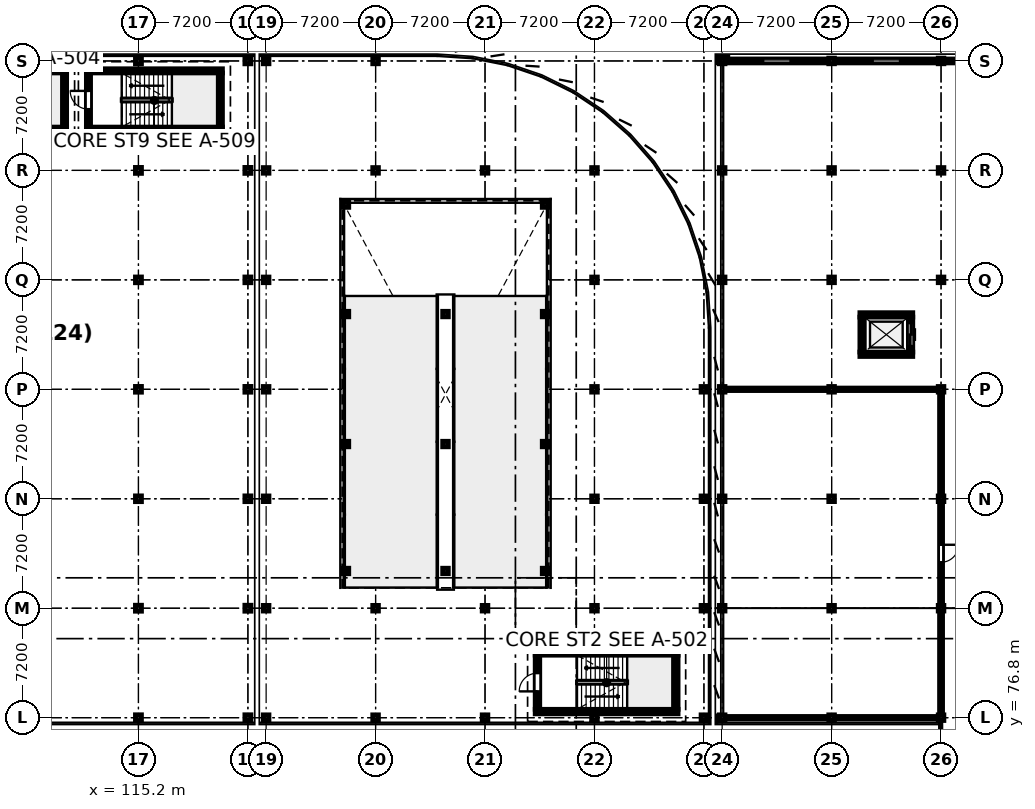
"""IFC4 building model, lengths in metres.
Left out: names, types, materials, properties, quantities, classifications, styles, units other than length and angle.
Written with IfcOpenShell. Run it as: python <this file> out.ifc"""

import sys

from ifc_helpers import new_model, si_unit, direction, frame, frame_2d, origin, origin_2d, place, context, subcontext, project, spatial, rectangle, i_section, extrude, element, fill, save


model = new_model("IFC4")
c1 = context("Model", 3, precision=1e-05, world=origin(), true_north=direction((0.0, 1.0)))
c2 = subcontext(c1, "Body", "Model", "MODEL_VIEW")
j1 = project(units=[si_unit("LENGTHUNIT", "METRE"), si_unit("PLANEANGLEUNIT", "RADIAN")], contexts=[c1])
p1 = place(None, origin())
s1 = spatial("IfcSite", under=j1, at=p1, CompositionType="ELEMENT")
p2 = place(p1, origin())
s2 = spatial("IfcBuilding", under=s1, at=p2, CompositionType="ELEMENT")
p3 = place(p2, frame((0.0, 0.0, 5.4)))
s3 = spatial("IfcBuildingStorey", under=s2, at=p3, CompositionType="ELEMENT", Elevation=5.4)
for number, where, z_axis, x_axis in (
    (1, (123.6, 76.8, 0.0), (0.0, 0.0, 1.0), (1.0, 0.0, 0.0)),
    (2, (123.6, 84.0, 0.0), (0.0, 0.0, 1.0), (1.0, 0.0, 0.0)),
    (3, (123.6, 91.2, 0.0), (0.0, 0.0, 1.0), (1.0, 0.0, 0.0)),
    (4, (123.6, 98.4, 0.0), (0.0, 0.0, 1.0), (1.0, 0.0, 0.0)),
    (5, (123.6, 105.6, 0.0), (0.0, 0.0, 1.0), (1.0, 0.0, 0.0)),
    (6, (123.6, 112.8, 0.0), (0.0, 0.0, 1.0), (1.0, 0.0, 0.0)),
    (7, (123.6, 120.0, 0.0), (0.0, 0.0, 1.0), (1.0, 0.0, 0.0)),
    (8, (130.8, 76.8, 0.0), (0.0, 0.0, 1.0), (1.0, 0.0, 0.0)),
    (9, (130.8, 84.0, 0.0), (0.0, 0.0, 1.0), (1.0, 0.0, 0.0)),
    (10, (130.8, 112.8, 0.0), (0.0, 0.0, 1.0), (1.0, 0.0, 0.0)),
    (11, (130.8, 120.0, 0.0), (0.0, 0.0, 1.0), (1.0, 0.0, 0.0)),
    (12, (138.0, 76.8, 0.0), (0.0, 0.0, 1.0), (1.0, 0.0, 0.0)),
    (13, (138.0, 84.0, 0.0), (0.0, 0.0, 1.0), (1.0, 0.0, 0.0)),
    (14, (138.0, 112.8, 0.0), (0.0, 0.0, 1.0), (1.0, 0.0, 0.0)),
    (15, (145.2, 76.8, 0.0), (0.0, 0.0, 1.0), (1.0, 0.0, 0.0)),
    (16, (145.2, 84.0, 0.0), (0.0, 0.0, 1.0), (1.0, 0.0, 0.0)),
    (17, (145.2, 91.2, 0.0), (0.0, 0.0, 1.0), (1.0, 0.0, 0.0)),
    (18, (145.2, 98.4, 0.0), (0.0, 0.0, 1.0), (1.0, 0.0, 0.0)),
    (19, (145.2, 105.6, 0.0), (0.0, 0.0, 1.0), (1.0, 0.0, 0.0)),
    (20, (145.2, 112.8, 0.0), (0.0, 0.0, 1.0), (1.0, 0.0, 0.0)),
    (21, (152.4, 76.8, 0.0), (0.0, 0.0, 1.0), (1.0, 0.0, 0.0)),
    (22, (152.4, 84.0, 0.0), (0.0, 0.0, 1.0), (1.0, 0.0, 0.0)),
    (23, (152.4, 91.2, 0.0), (0.0, 0.0, 1.0), (1.0, 0.0, 0.0)),
    (24, (152.4, 98.4, 0.0), (0.0, 0.0, 1.0), (1.0, 0.0, 0.0)),
):
    element("IfcColumn", number, at=place(p3, frame(where, z_axis=z_axis, x_axis=x_axis)), inside=s3, PredefinedType="COLUMN", context=c2, shape_type="SweptSolid", body=[
        extrude(i_section(OverallWidth=0.373, OverallDepth=0.373, WebThickness=0.016, FlangeThickness=0.026, FilletRadius=0.015, at=origin_2d()), origin(), (0.0, 0.0, 1.0), 3.9),
    ])
for number, where, z_axis, x_axis in (
    (25, (128.85, 86.45, 0.0), (0.0, 0.0, 1.0), (1.0, 0.0, 0.0)),
    (26, (135.4, 86.45, 0.0), (0.0, 0.0, 1.0), (1.0, 0.0, 0.0)),
    (27, (141.95, 86.45, 0.0), (0.0, 0.0, 1.0), (1.0, 0.0, 0.0)),
    (28, (128.85, 94.8, 0.0), (0.0, 0.0, 1.0), (1.0, 0.0, 0.0)),
    (29, (135.4, 94.8, 0.0), (0.0, 0.0, 1.0), (1.0, 0.0, 0.0)),
    (30, (141.95, 94.8, 0.0), (0.0, 0.0, 1.0), (1.0, 0.0, 0.0)),
    (31, (128.85, 103.35, 0.0), (0.0, 0.0, 1.0), (1.0, 0.0, 0.0)),
    (32, (135.4, 103.35, 0.0), (0.0, 0.0, 1.0), (1.0, 0.0, 0.0)),
    (33, (141.95, 103.35, 0.0), (0.0, 0.0, 1.0), (1.0, 0.0, 0.0)),
    (34, (128.85, 110.55, 0.0), (0.0, 0.0, 1.0), (1.0, 0.0, 0.0)),
    (35, (141.95, 110.55, 0.0), (0.0, 0.0, 1.0), (1.0, 0.0, 0.0)),
):
    element("IfcColumn", number, at=place(p3, frame(where, z_axis=z_axis, x_axis=x_axis)), inside=s3, PredefinedType="COLUMN", context=c2, shape_type="SweptSolid", body=[
        extrude(i_section(OverallWidth=0.371, OverallDepth=0.363, WebThickness=0.013, FlangeThickness=0.022, FilletRadius=0.015, at=origin_2d()), origin(), (0.0, 0.0, 1.0), 3.9),
    ])
p4 = place(p3, frame((115.2, 76.8, 0.0), z_axis=(0.0, 0.0, 1.0), x_axis=(1.0, 0.0, 0.0)))
e36 = element("IfcColumn", 36, at=p4, inside=s3, PredefinedType="COLUMN", context=c2, shape_type="SweptSolid", body=[
    extrude(i_section(OverallWidth=0.396, OverallDepth=0.381, WebThickness=0.019, FlangeThickness=0.03, FilletRadius=0.015, at=origin_2d()), origin(), (0.0, 0.0, 1.0), 3.9),
])
p5 = place(p3, frame((115.2, 84.0, 0.0), z_axis=(0.0, 0.0, 1.0), x_axis=(1.0, 0.0, 0.0)))
e37 = element("IfcColumn", 37, at=p5, inside=s3, PredefinedType="COLUMN", context=c2, shape_type="SweptSolid", body=[
    extrude(i_section(OverallWidth=0.399, OverallDepth=0.394, WebThickness=0.023, FlangeThickness=0.037, FilletRadius=0.015, at=origin_2d()), origin(), (0.0, 0.0, 1.0), 3.9),
])
for number, where, z_axis, x_axis in (
    (38, (115.2, 91.2, 0.0), (0.0, 0.0, 1.0), (1.0, 0.0, 0.0)),
    (39, (115.2, 98.4, 0.0), (0.0, 0.0, 1.0), (1.0, 0.0, 0.0)),
    (40, (115.2, 105.6, 0.0), (0.0, 0.0, 1.0), (1.0, 0.0, 0.0)),
):
    element("IfcColumn", number, at=place(p3, frame(where, z_axis=z_axis, x_axis=x_axis)), inside=s3, PredefinedType="COLUMN", context=c2, shape_type="SweptSolid", body=[
        extrude(i_section(OverallWidth=0.396, OverallDepth=0.381, WebThickness=0.019, FlangeThickness=0.03, FilletRadius=0.015, at=origin_2d()), origin(), (0.0, 0.0, 1.0), 3.9),
    ])
p6 = place(p3, frame((115.2, 112.8, 0.0), z_axis=(0.0, 0.0, 1.0), x_axis=(1.0, 0.0, 0.0)))
e41 = element("IfcColumn", 41, at=p6, inside=s3, PredefinedType="COLUMN", context=c2, shape_type="SweptSolid", body=[
    extrude(i_section(OverallWidth=0.399, OverallDepth=0.394, WebThickness=0.023, FlangeThickness=0.037, FilletRadius=0.015, at=origin_2d()), origin(), (0.0, 0.0, 1.0), 3.9),
])
for number, where, z_axis, x_axis in (
    (42, (115.2, 120.0, 0.0), (0.0, 0.0, 1.0), (1.0, 0.0, 0.0)),
    (43, (122.4, 76.8, 0.0), (0.0, 0.0, 1.0), (1.0, 0.0, 0.0)),
):
    element("IfcColumn", number, at=place(p3, frame(where, z_axis=z_axis, x_axis=x_axis)), inside=s3, PredefinedType="COLUMN", context=c2, shape_type="SweptSolid", body=[
        extrude(i_section(OverallWidth=0.396, OverallDepth=0.381, WebThickness=0.019, FlangeThickness=0.03, FilletRadius=0.015, at=origin_2d()), origin(), (0.0, 0.0, 1.0), 3.9),
    ])
p7 = place(p3, frame((122.4, 84.0, 0.0), z_axis=(0.0, 0.0, 1.0), x_axis=(1.0, 0.0, 0.0)))
e44 = element("IfcColumn", 44, at=p7, inside=s3, PredefinedType="COLUMN", context=c2, shape_type="SweptSolid", body=[
    extrude(i_section(OverallWidth=0.399, OverallDepth=0.394, WebThickness=0.023, FlangeThickness=0.037, FilletRadius=0.015, at=origin_2d()), origin(), (0.0, 0.0, 1.0), 3.9),
])
for number, where, z_axis, x_axis in (
    (45, (122.4, 91.2, 0.0), (0.0, 0.0, 1.0), (1.0, 0.0, 0.0)),
    (46, (122.4, 98.4, 0.0), (0.0, 0.0, 1.0), (1.0, 0.0, 0.0)),
    (47, (122.4, 105.6, 0.0), (0.0, 0.0, 1.0), (1.0, 0.0, 0.0)),
):
    element("IfcColumn", number, at=place(p3, frame(where, z_axis=z_axis, x_axis=x_axis)), inside=s3, PredefinedType="COLUMN", context=c2, shape_type="SweptSolid", body=[
        extrude(i_section(OverallWidth=0.396, OverallDepth=0.381, WebThickness=0.019, FlangeThickness=0.03, FilletRadius=0.015, at=origin_2d()), origin(), (0.0, 0.0, 1.0), 3.9),
    ])
p8 = place(p3, frame((122.4, 112.8, 0.0), z_axis=(0.0, 0.0, 1.0), x_axis=(1.0, 0.0, 0.0)))
e48 = element("IfcColumn", 48, at=p8, inside=s3, PredefinedType="COLUMN", context=c2, shape_type="SweptSolid", body=[
    extrude(i_section(OverallWidth=0.399, OverallDepth=0.394, WebThickness=0.023, FlangeThickness=0.037, FilletRadius=0.015, at=origin_2d()), origin(), (0.0, 0.0, 1.0), 3.9),
])
p9 = place(p3, frame((122.4, 120.0, 0.0), z_axis=(0.0, 0.0, 1.0), x_axis=(1.0, 0.0, 0.0)))
e49 = element("IfcColumn", 49, at=p9, inside=s3, PredefinedType="COLUMN", context=c2, shape_type="SweptSolid", body=[
    extrude(i_section(OverallWidth=0.396, OverallDepth=0.381, WebThickness=0.019, FlangeThickness=0.03, FilletRadius=0.015, at=origin_2d()), origin(), (0.0, 0.0, 1.0), 3.9),
])
for number, where, z_axis, x_axis in (
    (50, (153.6, 76.8, 0.0), (0.0, 0.0, 1.0), (1.0, 0.0, 0.0)),
    (51, (153.6, 84.0, 0.0), (0.0, 0.0, 1.0), (1.0, 0.0, 0.0)),
    (52, (153.6, 91.2, 0.0), (0.0, 0.0, 1.0), (1.0, 0.0, 0.0)),
    (53, (153.6, 98.4, 0.0), (0.0, 0.0, 1.0), (1.0, 0.0, 0.0)),
    (54, (153.6, 105.6, 0.0), (0.0, 0.0, 1.0), (1.0, 0.0, 0.0)),
    (55, (153.6, 112.8, 0.0), (0.0, 0.0, 1.0), (1.0, 0.0, 0.0)),
    (56, (153.6, 120.0, 0.0), (0.0, 0.0, 1.0), (1.0, 0.0, 0.0)),
    (57, (160.8, 76.8, 0.0), (0.0, 0.0, 1.0), (1.0, 0.0, 0.0)),
    (58, (160.8, 84.0, 0.0), (0.0, 0.0, 1.0), (1.0, 0.0, 0.0)),
    (59, (160.8, 91.2, 0.0), (0.0, 0.0, 1.0), (1.0, 0.0, 0.0)),
    (60, (160.8, 98.4, 0.0), (0.0, 0.0, 1.0), (1.0, 0.0, 0.0)),
    (61, (160.8, 105.6, 0.0), (0.0, 0.0, 1.0), (1.0, 0.0, 0.0)),
    (62, (160.8, 112.8, 0.0), (0.0, 0.0, 1.0), (1.0, 0.0, 0.0)),
    (63, (160.8, 120.0, 0.0), (0.0, 0.0, 1.0), (1.0, 0.0, 0.0)),
    (64, (168.0, 76.8, 0.0), (0.0, 0.0, 1.0), (1.0, 0.0, 0.0)),
    (65, (168.0, 84.0, 0.0), (0.0, 0.0, 1.0), (1.0, 0.0, 0.0)),
    (66, (168.0, 91.2, 0.0), (0.0, 0.0, 1.0), (1.0, 0.0, 0.0)),
    (67, (168.0, 98.4, 0.0), (0.0, 0.0, 1.0), (1.0, 0.0, 0.0)),
    (68, (168.0, 105.6, 0.0), (0.0, 0.0, 1.0), (1.0, 0.0, 0.0)),
    (69, (168.0, 112.8, 0.0), (0.0, 0.0, 1.0), (1.0, 0.0, 0.0)),
    (70, (168.0, 120.0, 0.0), (0.0, 0.0, 1.0), (1.0, 0.0, 0.0)),
):
    element("IfcColumn", number, at=place(p3, frame(where, z_axis=z_axis, x_axis=x_axis)), inside=s3, PredefinedType="COLUMN", context=c2, shape_type="SweptSolid", body=[
        extrude(i_section(OverallWidth=0.373, OverallDepth=0.373, WebThickness=0.016, FlangeThickness=0.026, FilletRadius=0.015, at=origin_2d()), origin(), (0.0, 0.0, 1.0), 3.9),
    ])
p10 = place(p3, frame((153.794, 120.0, 0.0), z_axis=(0.0, 0.0, 1.0), x_axis=(1.0, 0.0, 0.0)))
e71 = element("IfcWall", 71, at=p10, inside=s3, PredefinedType="STANDARD", context=c2, shape_type="SweptSolid", body=[
    extrude(rectangle(XDim=6.812, YDim=0.26, at=frame_2d((3.406, 0.0))), origin(), (0.0, 0.0, 1.0), 3.043),
])
p11 = place(p10, frame((2.506, 0.0, 0.9)))
e72 = element("IfcOpeningElement", 72, at=p11, cuts=e71, PredefinedType="OPENING", context=c2, shape_type="SweptSolid", body=[
    extrude(rectangle(XDim=1.8, YDim=1.5, at=frame_2d((0.9, 0.75))), frame((0.0, 0.14, 0.0), z_axis=(0.0, -1.0, 0.0), x_axis=(1.0, 0.0, 0.0)), (0.0, 0.0, 1.0), 0.28),
])
p12 = place(p3, frame((160.994, 120.0, 0.0), z_axis=(0.0, 0.0, 1.0), x_axis=(1.0, 0.0, 0.0)))
e73 = element("IfcWall", 73, at=p12, inside=s3, PredefinedType="STANDARD", context=c2, shape_type="SweptSolid", body=[
    extrude(rectangle(XDim=6.812, YDim=0.26, at=frame_2d((3.406, 0.0))), origin(), (0.0, 0.0, 1.0), 3.043),
])
p13 = place(p12, frame((2.506, 0.0, 0.9)))
e74 = element("IfcOpeningElement", 74, at=p13, cuts=e73, PredefinedType="OPENING", context=c2, shape_type="SweptSolid", body=[
    extrude(rectangle(XDim=1.8, YDim=1.5, at=frame_2d((0.9, 0.75))), frame((0.0, 0.14, 0.0), z_axis=(0.0, -1.0, 0.0), x_axis=(1.0, 0.0, 0.0)), (0.0, 0.0, 1.0), 0.28),
])
p14 = place(p3, frame((168.194, 120.0, 0.0), z_axis=(0.0, 0.0, 1.0), x_axis=(1.0, 0.0, 0.0)))
e75 = element("IfcWall", 75, at=p14, inside=s3, PredefinedType="STANDARD", context=c2, shape_type="SweptSolid", body=[
    extrude(rectangle(XDim=6.812, YDim=0.26, at=frame_2d((3.406, 0.0))), origin(), (0.0, 0.0, 1.0), 3.043),
])
p15 = place(p14, frame((2.506, 0.0, 0.9)))
e76 = element("IfcOpeningElement", 76, at=p15, cuts=e75, PredefinedType="OPENING", context=c2, shape_type="SweptSolid", body=[
    extrude(rectangle(XDim=1.8, YDim=1.5, at=frame_2d((0.9, 0.75))), frame((0.0, 0.14, 0.0), z_axis=(0.0, -1.0, 0.0), x_axis=(1.0, 0.0, 0.0)), (0.0, 0.0, 1.0), 0.28),
])
for number, where, z_axis, x_axis in (
    (77, (150.7, 77.2, 0.0), (0.0, 0.0, 1.0), (-1.0, 0.0, 0.0)),
    (78, (141.3, 81.06, 0.0), (0.0, 0.0, 1.0), (1.0, 0.0, 0.0)),
):
    element("IfcWall", number, at=place(p3, frame(where, z_axis=z_axis, x_axis=x_axis)), inside=s3, PredefinedType="SOLIDWALL", context=c2, shape_type="SweptSolid", body=[
        extrude(rectangle(XDim=9.4, YDim=0.3, at=frame_2d((4.7, 0.0))), origin(), (0.0, 0.0, 1.0), 3.65),
    ])
p16 = place(p3, frame((141.45, 77.35, 0.0), z_axis=(0.0, 0.0, 1.0), x_axis=(0.0, 1.0, 0.0)))
e79 = element("IfcWall", 79, at=p16, inside=s3, PredefinedType="SOLIDWALL", context=c2, shape_type="SweptSolid", body=[
    extrude(rectangle(XDim=3.56, YDim=0.3, at=frame_2d((1.78, 0.0))), origin(), (0.0, 0.0, 1.0), 3.65),
])
p17 = place(p16, frame((1.18, 0.0, 0.0)))
e80 = element("IfcOpeningElement", 80, at=p17, cuts=e79, PredefinedType="OPENING", context=c2, shape_type="SweptSolid", body=[
    extrude(rectangle(XDim=1.2, YDim=2.2, at=frame_2d((0.6, 1.1))), frame((0.0, 0.16, 0.0), z_axis=(0.0, -1.0, 0.0), x_axis=(1.0, 0.0, 0.0)), (0.0, 0.0, 1.0), 0.32),
])
p18 = place(p3, frame((150.55, 80.91, 0.0), z_axis=(0.0, 0.0, 1.0), x_axis=(0.0, -1.0, 0.0)))
e81 = element("IfcWall", 81, at=p18, inside=s3, PredefinedType="SOLIDWALL", context=c2, shape_type="SweptSolid", body=[
    extrude(rectangle(XDim=3.56, YDim=0.3, at=frame_2d((1.78, 0.0))), origin(), (0.0, 0.0, 1.0), 3.65),
])
for number, where, z_axis, x_axis in (
    (82, (110.475, 115.512, 0.0), (0.0, 0.0, 1.0), (-1.0, 0.0, 0.0)),
    (83, (101.575, 119.348, 0.0), (0.0, 0.0, 1.0), (1.0, 0.0, 0.0)),
):
    element("IfcWall", number, at=place(p3, frame(where, z_axis=z_axis, x_axis=x_axis)), inside=s3, PredefinedType="SOLIDWALL", context=c2, shape_type="SweptSolid", body=[
        extrude(rectangle(XDim=8.9, YDim=0.275, at=frame_2d((4.45, 0.0))), origin(), (0.0, 0.0, 1.0), 3.67),
    ])
p19 = place(p3, frame((110.338, 119.21, 0.0), z_axis=(0.0, 0.0, 1.0), x_axis=(0.0, -1.0, 0.0)))
e84 = element("IfcWall", 84, at=p19, inside=s3, PredefinedType="SOLIDWALL", context=c2, shape_type="SweptSolid", body=[
    extrude(rectangle(XDim=3.56, YDim=0.275, at=frame_2d((1.78, 0.0))), origin(), (0.0, 0.0, 1.0), 3.67),
])
for number, where, z_axis, x_axis in (
    (85, (120.725, 115.512, 0.0), (0.0, 0.0, 1.0), (-1.0, 0.0, 0.0)),
    (86, (111.775, 119.348, 0.0), (0.0, 0.0, 1.0), (1.0, 0.0, 0.0)),
):
    element("IfcWall", number, at=place(p3, frame(where, z_axis=z_axis, x_axis=x_axis)), inside=s3, PredefinedType="SOLIDWALL", context=c2, shape_type="SweptSolid", body=[
        extrude(rectangle(XDim=8.95, YDim=0.275, at=frame_2d((4.475, 0.0))), origin(), (0.0, 0.0, 1.0), 3.67),
    ])
p20 = place(p3, frame((111.912, 115.65, 0.0), z_axis=(0.0, 0.0, 1.0), x_axis=(0.0, 1.0, 0.0)))
e87 = element("IfcWall", 87, at=p20, inside=s3, PredefinedType="SOLIDWALL", context=c2, shape_type="SweptSolid", body=[
    extrude(rectangle(XDim=3.56, YDim=0.275, at=frame_2d((1.78, 0.0))), origin(), (0.0, 0.0, 1.0), 3.67),
])
p21 = place(p20, frame((1.18, 0.0, 0.0)))
e88 = element("IfcOpeningElement", 88, at=p21, cuts=e87, PredefinedType="OPENING", context=c2, shape_type="SweptSolid", body=[
    extrude(rectangle(XDim=1.2, YDim=2.2, at=frame_2d((0.6, 1.1))), frame((0.0, 0.147, 0.0), z_axis=(0.0, -1.0, 0.0), x_axis=(1.0, 0.0, 0.0)), (0.0, 0.0, 1.0), 0.295),
])
p22 = place(p3, frame((120.588, 119.21, 0.0), z_axis=(0.0, 0.0, 1.0), x_axis=(0.0, -1.0, 0.0)))
e89 = element("IfcWall", 89, at=p22, inside=s3, PredefinedType="SOLIDWALL", context=c2, shape_type="SweptSolid", body=[
    extrude(rectangle(XDim=3.56, YDim=0.275, at=frame_2d((1.78, 0.0))), origin(), (0.0, 0.0, 1.0), 3.67),
])
for number, where, z_axis, x_axis in (
    (90, (166.14, 100.705, 0.0), (0.0, 0.0, 1.0), (-1.0, 0.0, 0.0)),
    (91, (162.66, 103.295, 0.0), (0.0, 0.0, 1.0), (1.0, 0.0, 0.0)),
):
    element("IfcWall", number, at=place(p3, frame(where, z_axis=z_axis, x_axis=x_axis)), inside=s3, PredefinedType="SHEAR", context=c2, shape_type="SweptSolid", body=[
        extrude(rectangle(XDim=3.48, YDim=0.29, at=frame_2d((1.74, 0.0))), origin(), (0.0, 0.0, 1.0), 3.67),
    ])
p23 = place(p3, frame((162.805, 100.85, 0.0), z_axis=(0.0, 0.0, 1.0), x_axis=(0.0, 1.0, 0.0)))
e92 = element("IfcWall", 92, at=p23, inside=s3, PredefinedType="SHEAR", context=c2, shape_type="SweptSolid", body=[
    extrude(rectangle(XDim=2.3, YDim=0.29, at=frame_2d((1.15, 0.0))), origin(), (0.0, 0.0, 1.0), 3.67),
])
p24 = place(p3, frame((165.995, 103.15, 0.0), z_axis=(0.0, 0.0, 1.0), x_axis=(0.0, -1.0, 0.0)))
e93 = element("IfcWall", 93, at=p24, inside=s3, PredefinedType="SHEAR", context=c2, shape_type="SweptSolid", body=[
    extrude(rectangle(XDim=2.3, YDim=0.29, at=frame_2d((1.15, 0.0))), origin(), (0.0, 0.0, 1.0), 3.67),
])
p25 = place(p24, frame((0.4, 0.0, 0.0)))
e94 = element("IfcOpeningElement", 94, at=p25, cuts=e93, PredefinedType="OPENING", context=c2, shape_type="SweptSolid", body=[
    extrude(rectangle(XDim=1.5, YDim=2.3, at=frame_2d((0.75, 1.15))), frame((0.0, 0.155, 0.0), z_axis=(0.0, -1.0, 0.0), x_axis=(1.0, 0.0, 0.0)), (0.0, 0.0, 1.0), 0.31),
])
p26 = place(p3, frame((168.08, 76.8, 0.0), z_axis=(0.0, 0.0, 1.0), x_axis=(-1.0, 0.0, 0.0)))
e95 = element("IfcWall", 95, at=p26, inside=s3, PredefinedType="PARTITIONING", context=c2, shape_type="SweptSolid", body=[
    extrude(rectangle(XDim=14.348, YDim=0.16, at=frame_2d((7.174, 0.0))), origin(), (0.0, 0.0, 1.0), 3.038),
])
p27 = place(p3, frame((153.732, 98.4, 0.0), z_axis=(0.0, 0.0, 1.0), x_axis=(1.0, 0.0, 0.0)))
e96 = element("IfcWall", 96, at=p27, inside=s3, PredefinedType="PARTITIONING", context=c2, shape_type="SweptSolid", body=[
    extrude(rectangle(XDim=14.348, YDim=0.165, at=frame_2d((7.174, 0.0))), origin(), (0.0, 0.0, 1.0), 3.038),
])
p28 = place(p3, frame((168.0, 98.316, 0.0), z_axis=(0.0, 0.0, 1.0), x_axis=(0.0, -1.0, 0.0)))
e97 = element("IfcWall", 97, at=p28, inside=s3, PredefinedType="PARTITIONING", context=c2, shape_type="SweptSolid", body=[
    extrude(rectangle(XDim=21.434, YDim=0.198, at=frame_2d((10.717, 0.0))), origin(), (0.0, 0.0, 1.0), 3.038),
])
p29 = place(p28, frame((10.142, 0.0, 0.0)))
e98 = element("IfcOpeningElement", 98, at=p29, cuts=e97, PredefinedType="OPENING", context=c2, shape_type="SweptSolid", body=[
    extrude(rectangle(XDim=1.15, YDim=2.34, at=frame_2d((0.575, 1.17))), frame((0.0, 0.109, 0.0), z_axis=(0.0, -1.0, 0.0), x_axis=(1.0, 0.0, 0.0)), (0.0, 0.0, 1.0), 0.218),
])
p30 = place(p11, origin())
e99 = element("IfcWindow", 99, at=p30, inside=s3, PartitioningType="SINGLE_PANEL", PredefinedType="WINDOW", context=c2, shape_type="SweptSolid", body=[
    extrude(rectangle(XDim=1.8, YDim=1.5, at=frame_2d((0.9, 0.75))), frame((0.0, 0.03, 0.0), z_axis=(0.0, -1.0, 0.0), x_axis=(1.0, 0.0, 0.0)), (0.0, 0.0, 1.0), 0.06),
])
fill(e72, e99)
p31 = place(p13, origin())
e100 = element("IfcWindow", 100, at=p31, inside=s3, PartitioningType="SINGLE_PANEL", PredefinedType="WINDOW", context=c2, shape_type="SweptSolid", body=[
    extrude(rectangle(XDim=1.8, YDim=1.5, at=frame_2d((0.9, 0.75))), frame((0.0, 0.03, 0.0), z_axis=(0.0, -1.0, 0.0), x_axis=(1.0, 0.0, 0.0)), (0.0, 0.0, 1.0), 0.06),
])
fill(e74, e100)
p32 = place(p17, origin())
e101 = element("IfcDoor", 101, at=p32, inside=s3, OperationType="SINGLE_SWING_LEFT", PredefinedType="DOOR", context=c2, shape_type="SweptSolid", body=[
    extrude(rectangle(XDim=1.2, YDim=2.2, at=frame_2d((0.6, 1.1))), frame((0.0, 0.025, 0.0), z_axis=(0.0, -1.0, 0.0), x_axis=(1.0, 0.0, 0.0)), (0.0, 0.0, 1.0), 0.05),
])
fill(e80, e101)
p33 = place(p21, origin())
e102 = element("IfcDoor", 102, at=p33, inside=s3, OperationType="SINGLE_SWING_RIGHT", PredefinedType="DOOR", context=c2, shape_type="SweptSolid", body=[
    extrude(rectangle(XDim=1.2, YDim=2.2, at=frame_2d((0.6, 1.1))), frame((0.0, 0.025, 0.0), z_axis=(0.0, -1.0, 0.0), x_axis=(1.0, 0.0, 0.0)), (0.0, 0.0, 1.0), 0.05),
])
fill(e88, e102)
p34 = place(p25, origin())
e103 = element("IfcDoor", 103, at=p34, inside=s3, OperationType="DOUBLE_DOOR_SLIDING", PredefinedType="DOOR", context=c2, shape_type="SweptSolid", body=[
    extrude(rectangle(XDim=1.5, YDim=2.3, at=frame_2d((0.75, 1.15))), frame((0.0, 0.025, 0.0), z_axis=(0.0, -1.0, 0.0), x_axis=(1.0, 0.0, 0.0)), (0.0, 0.0, 1.0), 0.05),
])
fill(e94, e103)
p35 = place(p29, origin())
e104 = element("IfcDoor", 104, at=p35, inside=s3, OperationType="SINGLE_SWING_LEFT", PredefinedType="DOOR", context=c2, shape_type="SweptSolid", body=[
    extrude(rectangle(XDim=1.15, YDim=2.34, at=frame_2d((0.575, 1.17))), frame((0.0, 0.025, 0.0), z_axis=(0.0, -1.0, 0.0), x_axis=(1.0, 0.0, 0.0)), (0.0, 0.0, 1.0), 0.05),
])
fill(e98, e104)
save(model, sys.argv[1])
